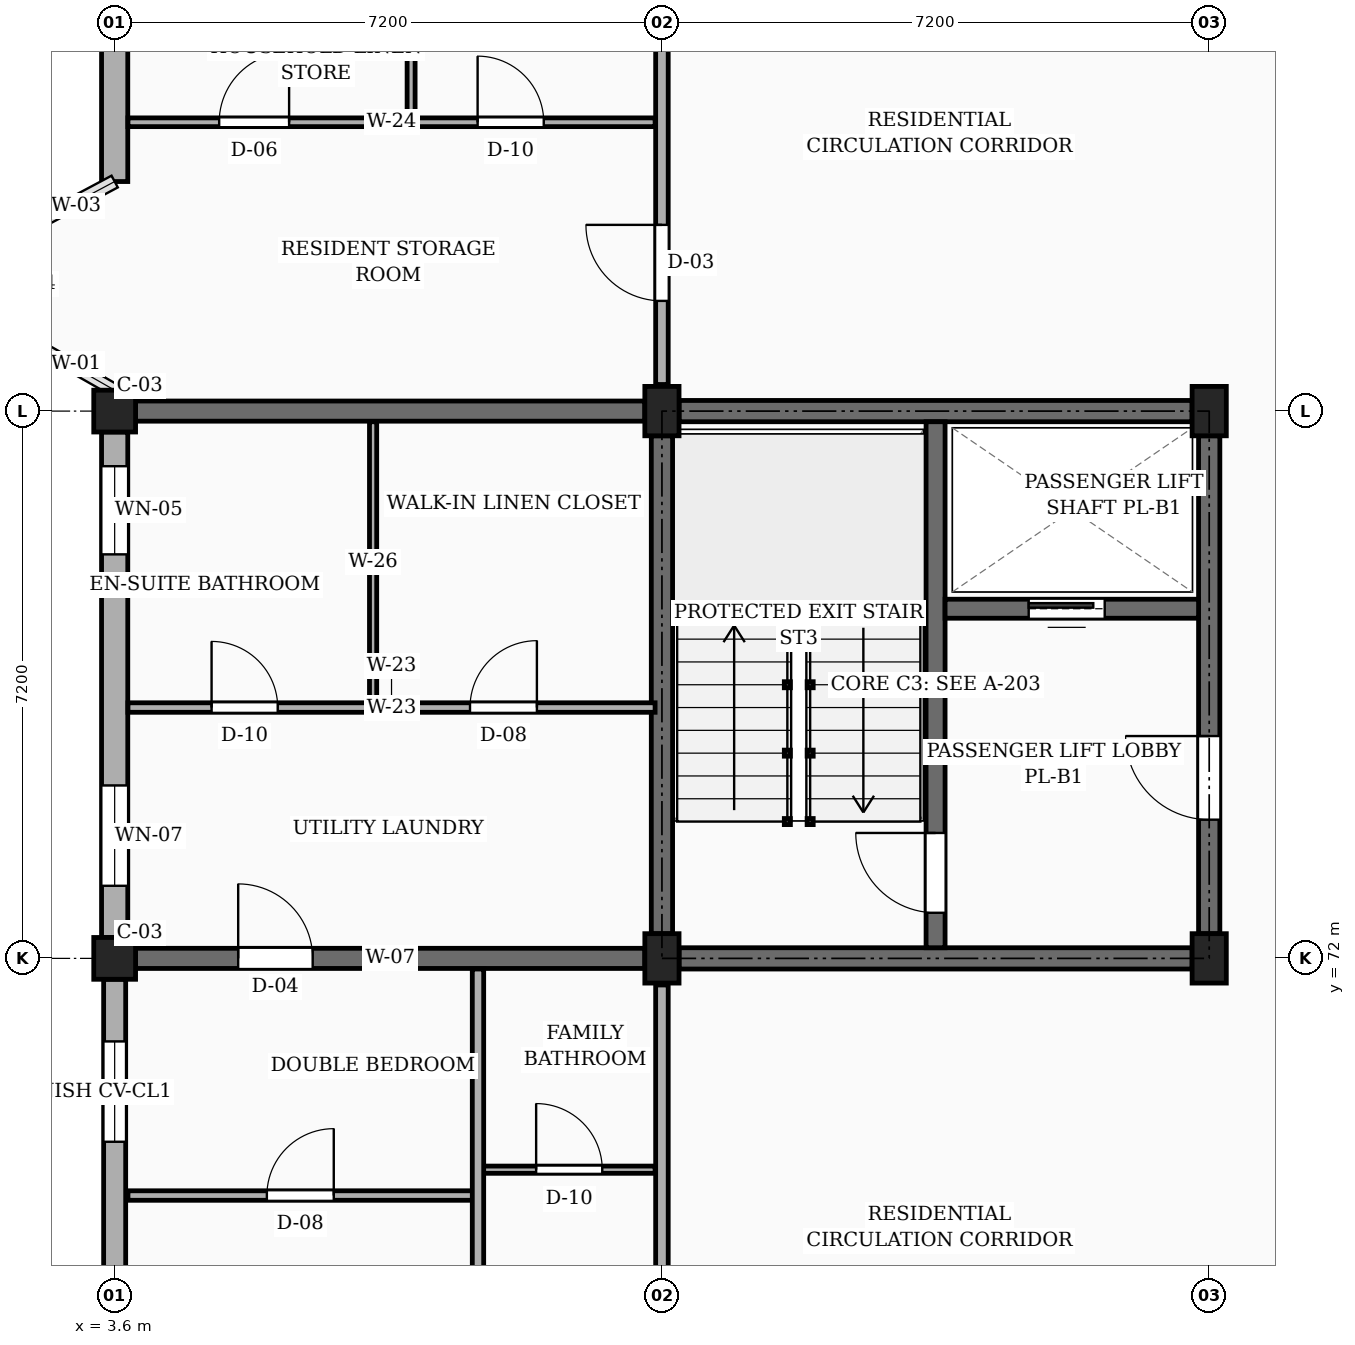
"""IFC4 building model, lengths in metres.
Left out: names, types, materials, properties, quantities, classifications, styles, units other than length and angle.
Written with IfcOpenShell. Run it as: python <this file> out.ifc"""

import sys

from ifc_helpers import new_model, si_unit, direction, frame, frame_2d, origin, origin_2d, place, context, subcontext, project, spatial, rectangle, extrude, element, fill, save


model = new_model("IFC4")
c1 = context("Model", 3, precision=1e-05, world=origin(), true_north=direction((0.0, 1.0)))
c2 = subcontext(c1, "Body", "Model", "MODEL_VIEW")
j1 = project(units=[si_unit("LENGTHUNIT", "METRE"), si_unit("PLANEANGLEUNIT", "RADIAN")], contexts=[c1])
p1 = place(None, origin())
s1 = spatial("IfcSite", under=j1, at=p1, CompositionType="ELEMENT")
p2 = place(p1, origin())
s2 = spatial("IfcBuilding", under=s1, at=p2, CompositionType="ELEMENT")
p3 = place(p2, frame((0.0, 0.0, 10.8)))
s3 = spatial("IfcBuildingStorey", under=s2, at=p3, CompositionType="ELEMENT", Elevation=10.8)
for number, where, z_axis, x_axis in (
    (1, (3.6, 72.0, 0.0), (0.0, 0.0, 1.0), (1.0, 0.0, 0.0)),
    (2, (3.6, 79.2, 0.0), (0.0, 0.0, 1.0), (1.0, 0.0, 0.0)),
):
    element("IfcColumn", number, at=place(p3, frame(where, z_axis=z_axis, x_axis=x_axis)), inside=s3, PredefinedType="COLUMN", context=c2, shape_type="SweptSolid", body=[
        extrude(rectangle(XDim=0.55, YDim=0.55, at=origin_2d()), origin(), (0.0, 0.0, 1.0), 3.15),
    ])
for number, where, z_axis, x_axis in (
    (3, (10.8, 72.0, 0.0), (0.0, 0.0, 1.0), (1.0, 0.0, 0.0)),
    (4, (10.8, 79.2, 0.0), (0.0, 0.0, 1.0), (1.0, 0.0, 0.0)),
    (5, (18.0, 72.0, 0.0), (0.0, 0.0, 1.0), (1.0, 0.0, 0.0)),
    (6, (18.0, 79.2, 0.0), (0.0, 0.0, 1.0), (1.0, 0.0, 0.0)),
):
    element("IfcColumn", number, at=place(p3, frame(where, z_axis=z_axis, x_axis=x_axis)), inside=s3, PredefinedType="COLUMN", context=c2, shape_type="SweptSolid", body=[
        extrude(rectangle(XDim=0.45, YDim=0.65, at=origin_2d()), origin(), (0.0, 0.0, 1.0), 3.15),
    ])
p4 = place(p3, frame((3.875, 72.0, 0.0), z_axis=(0.0, 0.0, 1.0), x_axis=(1.0, 0.0, 0.0)))
e7 = element("IfcWall", 7, at=p4, inside=s3, PredefinedType="SOLIDWALL", context=c2, shape_type="SweptSolid", body=[
    extrude(rectangle(XDim=6.7, YDim=0.265, at=frame_2d((3.35, 0.0))), origin(), (0.0, 0.0, 1.0), 2.21),
])
p5 = place(p4, frame((1.35, 0.0, 0.0)))
e8 = element("IfcOpeningElement", 8, at=p5, cuts=e7, PredefinedType="OPENING", context=c2, shape_type="SweptSolid", body=[
    extrude(rectangle(XDim=0.98, YDim=2.12, at=frame_2d((0.49, 1.06))), frame((0.0, 0.143, 0.0), z_axis=(0.0, -1.0, 0.0), x_axis=(1.0, 0.0, 0.0)), (0.0, 0.0, 1.0), 0.285),
])
p6 = place(p3, frame((3.875, 79.2, 0.0), z_axis=(0.0, 0.0, 1.0), x_axis=(1.0, 0.0, 0.0)))
e9 = element("IfcWall", 9, at=p6, inside=s3, PredefinedType="SOLIDWALL", context=c2, shape_type="SweptSolid", body=[
    extrude(rectangle(XDim=6.7, YDim=0.265, at=frame_2d((3.35, 0.0))), origin(), (0.0, 0.0, 1.0), 2.21),
])
p7 = place(p3, frame((3.6, 86.125, 0.0), z_axis=(0.0, 0.0, 1.0), x_axis=(0.0, -1.0, 0.0)))
e10 = element("IfcWall", 10, at=p7, inside=s3, PredefinedType="SOLIDWALL", context=c2, shape_type="SweptSolid", body=[
    extrude(rectangle(XDim=3.905, YDim=0.345, at=frame_2d((1.953, 0.0))), origin(), (0.0, 0.0, 1.0), 2.48),
])
p8 = place(p7, frame((1.077, 0.0, 0.78)))
e11 = element("IfcOpeningElement", 11, at=p8, cuts=e10, PredefinedType="OPENING", context=c2, shape_type="SweptSolid", body=[
    extrude(rectangle(XDim=1.08, YDim=1.15, at=frame_2d((0.54, 0.575))), frame((0.0, 0.183, 0.0), z_axis=(0.0, -1.0, 0.0), x_axis=(1.0, 0.0, 0.0)), (0.0, 0.0, 1.0), 0.365),
])
p9 = place(p3, frame((3.6, 78.925, 0.0), z_axis=(0.0, 0.0, 1.0), x_axis=(0.0, -1.0, 0.0)))
e12 = element("IfcWall", 12, at=p9, inside=s3, PredefinedType="SOLIDWALL", context=c2, shape_type="SweptSolid", body=[
    extrude(rectangle(XDim=6.65, YDim=0.345, at=frame_2d((3.325, 0.0))), origin(), (0.0, 0.0, 1.0), 2.48),
])
p10 = place(p9, frame((0.45, 0.0, 0.78)))
e13 = element("IfcOpeningElement", 13, at=p10, cuts=e12, PredefinedType="OPENING", context=c2, shape_type="SweptSolid", body=[
    extrude(rectangle(XDim=1.16, YDim=1.15, at=frame_2d((0.58, 0.575))), frame((0.0, 0.183, 0.0), z_axis=(0.0, -1.0, 0.0), x_axis=(1.0, 0.0, 0.0)), (0.0, 0.0, 1.0), 0.365),
])
p11 = place(p9, frame((4.65, 0.0, 0.78)))
e14 = element("IfcOpeningElement", 14, at=p11, cuts=e12, PredefinedType="OPENING", context=c2, shape_type="SweptSolid", body=[
    extrude(rectangle(XDim=1.32, YDim=1.15, at=frame_2d((0.66, 0.575))), frame((0.0, 0.183, 0.0), z_axis=(0.0, -1.0, 0.0), x_axis=(1.0, 0.0, 0.0)), (0.0, 0.0, 1.0), 0.365),
])
p12 = place(p3, frame((3.6, 71.725, 0.0), z_axis=(0.0, 0.0, 1.0), x_axis=(0.0, -1.0, 0.0)))
e15 = element("IfcWall", 15, at=p12, inside=s3, PredefinedType="SOLIDWALL", context=c2, shape_type="SweptSolid", body=[
    extrude(rectangle(XDim=3.905, YDim=0.29, at=frame_2d((1.953, 0.0))), origin(), (0.0, 0.0, 1.0), 2.48),
])
p13 = place(p12, frame((0.817, 0.0, 0.78)))
e16 = element("IfcOpeningElement", 16, at=p13, cuts=e15, PredefinedType="OPENING", context=c2, shape_type="SweptSolid", body=[
    extrude(rectangle(XDim=1.32, YDim=1.15, at=frame_2d((0.66, 0.575))), frame((0.0, 0.155, 0.0), z_axis=(0.0, -1.0, 0.0), x_axis=(1.0, 0.0, 0.0)), (0.0, 0.0, 1.0), 0.31),
])
p14 = place(p3, frame((10.8, 72.325, 0.0), z_axis=(0.0, 0.0, 1.0), x_axis=(0.0, 1.0, 0.0)))
e17 = element("IfcWall", 17, at=p14, inside=s3, PredefinedType="SHEAR", context=c2, shape_type="SweptSolid", body=[
    extrude(rectangle(XDim=6.55, YDim=0.28, at=frame_2d((3.275, 0.0))), origin(), (0.0, 0.0, 1.0), 2.91),
])
p15 = place(p3, frame((11.025, 79.2, 0.0), z_axis=(0.0, 0.0, 1.0), x_axis=(1.0, 0.0, 0.0)))
e18 = element("IfcWall", 18, at=p15, inside=s3, PredefinedType="SHEAR", context=c2, shape_type="SweptSolid", body=[
    extrude(rectangle(XDim=6.75, YDim=0.28, at=frame_2d((3.375, 0.0))), origin(), (0.0, 0.0, 1.0), 2.91),
])
p16 = place(p3, frame((18.0, 72.325, 0.0), z_axis=(0.0, 0.0, 1.0), x_axis=(0.0, 1.0, 0.0)))
e19 = element("IfcWall", 19, at=p16, inside=s3, PredefinedType="SHEAR", context=c2, shape_type="SweptSolid", body=[
    extrude(rectangle(XDim=6.55, YDim=0.28, at=frame_2d((3.275, 0.0))), origin(), (0.0, 0.0, 1.0), 2.91),
])
p17 = place(p16, frame((1.5, 0.0, 0.0)))
e20 = element("IfcOpeningElement", 20, at=p17, cuts=e19, PredefinedType="OPENING", context=c2, shape_type="SweptSolid", body=[
    extrude(rectangle(XDim=1.1, YDim=2.15, at=frame_2d((0.55, 1.075))), frame((0.0, 0.15, 0.0), z_axis=(0.0, -1.0, 0.0), x_axis=(1.0, 0.0, 0.0)), (0.0, 0.0, 1.0), 0.3),
])
p18 = place(p3, frame((11.025, 72.0, 0.0), z_axis=(0.0, 0.0, 1.0), x_axis=(1.0, 0.0, 0.0)))
e21 = element("IfcWall", 21, at=p18, inside=s3, PredefinedType="SHEAR", context=c2, shape_type="SweptSolid", body=[
    extrude(rectangle(XDim=6.75, YDim=0.28, at=frame_2d((3.375, 0.0))), origin(), (0.0, 0.0, 1.0), 2.91),
])
p19 = place(p3, frame((14.4, 72.14, 0.0), z_axis=(0.0, 0.0, 1.0), x_axis=(0.0, 1.0, 0.0)))
e22 = element("IfcWall", 22, at=p19, inside=s3, PredefinedType="SHEAR", context=c2, shape_type="SweptSolid", body=[
    extrude(rectangle(XDim=6.92, YDim=0.25, at=frame_2d((3.46, 0.0))), origin(), (0.0, 0.0, 1.0), 2.91),
])
p20 = place(p19, frame((0.46, 0.0, 0.0)))
e23 = element("IfcOpeningElement", 23, at=p20, cuts=e22, PredefinedType="OPENING", context=c2, shape_type="SweptSolid", body=[
    extrude(rectangle(XDim=1.05, YDim=2.15, at=frame_2d((0.525, 1.075))), frame((0.0, 0.135, 0.0), z_axis=(0.0, -1.0, 0.0), x_axis=(1.0, 0.0, 0.0)), (0.0, 0.0, 1.0), 0.27),
])
p21 = place(p3, frame((14.525, 76.6, 0.0), z_axis=(0.0, 0.0, 1.0), x_axis=(1.0, 0.0, 0.0)))
e24 = element("IfcWall", 24, at=p21, inside=s3, PredefinedType="SHEAR", context=c2, shape_type="SweptSolid", body=[
    extrude(rectangle(XDim=3.335, YDim=0.25, at=frame_2d((1.667, 0.0))), origin(), (0.0, 0.0, 1.0), 2.91),
])
p22 = place(p21, frame((1.1, 0.0, 0.0)))
e25 = element("IfcOpeningElement", 25, at=p22, cuts=e24, PredefinedType="OPENING", context=c2, shape_type="SweptSolid", body=[
    extrude(rectangle(XDim=1.0, YDim=2.2, at=frame_2d((0.5, 1.1))), frame((0.0, 0.135, 0.0), z_axis=(0.0, -1.0, 0.0), x_axis=(1.0, 0.0, 0.0)), (0.0, 0.0, 1.0), 0.27),
])
p23 = place(p3, frame((10.8, 65.15, 0.0), z_axis=(0.0, 0.0, 1.0), x_axis=(0.0, 1.0, 0.0)))
e26 = element("IfcWall", 26, at=p23, inside=s3, PredefinedType="PARTITIONING", context=c2, shape_type="SweptSolid", body=[
    extrude(rectangle(XDim=6.5, YDim=0.165, at=frame_2d((3.25, 0.0))), origin(), (0.0, 0.0, 1.0), 2.26),
])
p24 = place(p23, frame((1.0, 0.0, 0.0)))
e27 = element("IfcOpeningElement", 27, at=p24, cuts=e26, PredefinedType="OPENING", context=c2, shape_type="SweptSolid", body=[
    extrude(rectangle(XDim=1.14, YDim=2.18, at=frame_2d((0.57, 1.09))), frame((0.0, 0.093, 0.0), z_axis=(0.0, -1.0, 0.0), x_axis=(1.0, 0.0, 0.0)), (0.0, 0.0, 1.0), 0.185),
])
p25 = place(p3, frame((10.8, 79.55, 0.0), z_axis=(0.0, 0.0, 1.0), x_axis=(0.0, 1.0, 0.0)))
e28 = element("IfcWall", 28, at=p25, inside=s3, PredefinedType="PARTITIONING", context=c2, shape_type="SweptSolid", body=[
    extrude(rectangle(XDim=6.5, YDim=0.165, at=frame_2d((3.25, 0.0))), origin(), (0.0, 0.0, 1.0), 2.26),
])
p26 = place(p25, frame((1.1, 0.0, 0.0)))
e29 = element("IfcOpeningElement", 29, at=p26, cuts=e28, PredefinedType="OPENING", context=c2, shape_type="SweptSolid", body=[
    extrude(rectangle(XDim=1.0, YDim=2.15, at=frame_2d((0.5, 1.075))), frame((0.0, 0.093, 0.0), z_axis=(0.0, -1.0, 0.0), x_axis=(1.0, 0.0, 0.0)), (0.0, 0.0, 1.0), 0.185),
])
p27 = place(p3, frame((3.775, 68.88, 0.0), z_axis=(0.0, 0.0, 1.0), x_axis=(1.0, 0.0, 0.0)))
e30 = element("IfcWall", 30, at=p27, inside=s3, PredefinedType="PARTITIONING", context=c2, shape_type="SweptSolid", body=[
    extrude(rectangle(XDim=4.535, YDim=0.125, at=frame_2d((2.268, 0.0))), origin(), (0.0, 0.0, 1.0), 2.345),
])
p28 = place(p27, frame((1.827, 0.0, 0.0)))
e31 = element("IfcOpeningElement", 31, at=p28, cuts=e30, PredefinedType="OPENING", context=c2, shape_type="SweptSolid", body=[
    extrude(rectangle(XDim=0.88, YDim=2.08, at=frame_2d((0.44, 1.04))), frame((0.0, 0.073, 0.0), z_axis=(0.0, -1.0, 0.0), x_axis=(1.0, 0.0, 0.0)), (0.0, 0.0, 1.0), 0.145),
])
p29 = place(p3, frame((8.45, 69.22, 0.0), z_axis=(0.0, 0.0, 1.0), x_axis=(1.0, 0.0, 0.0)))
e32 = element("IfcWall", 32, at=p29, inside=s3, PredefinedType="PARTITIONING", context=c2, shape_type="SweptSolid", body=[
    extrude(rectangle(XDim=2.26, YDim=0.095, at=frame_2d((1.13, 0.0))), origin(), (0.0, 0.0, 1.0), 2.345),
])
p30 = place(p29, frame((0.695, 0.0, 0.0)))
e33 = element("IfcOpeningElement", 33, at=p30, cuts=e32, PredefinedType="OPENING", context=c2, shape_type="SweptSolid", body=[
    extrude(rectangle(XDim=0.87, YDim=2.05, at=frame_2d((0.435, 1.025))), frame((0.0, 0.058, 0.0), z_axis=(0.0, -1.0, 0.0), x_axis=(1.0, 0.0, 0.0)), (0.0, 0.0, 1.0), 0.115),
])
p31 = place(p3, frame((8.38, 64.975, 0.0), z_axis=(0.0, 0.0, 1.0), x_axis=(0.0, 1.0, 0.0)))
e34 = element("IfcWall", 34, at=p31, inside=s3, PredefinedType="PARTITIONING", context=c2, shape_type="SweptSolid", body=[
    extrude(rectangle(XDim=6.885, YDim=0.15, at=frame_2d((3.442, 0.0))), origin(), (0.0, 0.0, 1.0), 2.345),
])
p32 = place(p31, frame((1.275, 0.0, 0.0)))
e35 = element("IfcOpeningElement", 35, at=p32, cuts=e34, PredefinedType="OPENING", context=c2, shape_type="SweptSolid", body=[
    extrude(rectangle(XDim=0.92, YDim=2.1, at=frame_2d((0.46, 1.05))), frame((0.0, 0.085, 0.0), z_axis=(0.0, -1.0, 0.0), x_axis=(1.0, 0.0, 0.0)), (0.0, 0.0, 1.0), 0.17),
])
p33 = place(p3, frame((3.775, 75.3, 0.0), z_axis=(0.0, 0.0, 1.0), x_axis=(1.0, 0.0, 0.0)))
e36 = element("IfcWall", 36, at=p33, inside=s3, PredefinedType="PARTITIONING", context=c2, shape_type="SweptSolid", body=[
    extrude(rectangle(XDim=6.935, YDim=0.125, at=frame_2d((3.468, 0.0))), origin(), (0.0, 0.0, 1.0), 2.345),
])
p34 = place(p33, frame((1.1, 0.0, 0.0)))
e37 = element("IfcOpeningElement", 37, at=p34, cuts=e36, PredefinedType="OPENING", context=c2, shape_type="SweptSolid", body=[
    extrude(rectangle(XDim=0.87, YDim=2.05, at=frame_2d((0.435, 1.025))), frame((0.0, 0.073, 0.0), z_axis=(0.0, -1.0, 0.0), x_axis=(1.0, 0.0, 0.0)), (0.0, 0.0, 1.0), 0.145),
])
p35 = place(p33, frame((4.5, 0.0, 0.0)))
e38 = element("IfcOpeningElement", 38, at=p35, cuts=e36, PredefinedType="OPENING", context=c2, shape_type="SweptSolid", body=[
    extrude(rectangle(XDim=0.88, YDim=2.08, at=frame_2d((0.44, 1.04))), frame((0.0, 0.073, 0.0), z_axis=(0.0, -1.0, 0.0), x_axis=(1.0, 0.0, 0.0)), (0.0, 0.0, 1.0), 0.145),
])
p36 = place(p3, frame((7.0, 75.37, 0.0), z_axis=(0.0, 0.0, 1.0), x_axis=(0.0, 1.0, 0.0)))
e39 = element("IfcWall", 39, at=p36, inside=s3, PredefinedType="PARTITIONING", context=c2, shape_type="SweptSolid", body=[
    extrude(rectangle(XDim=3.69, YDim=0.095, at=frame_2d((1.845, 0.0))), origin(), (0.0, 0.0, 1.0), 2.345),
])
p37 = place(p3, frame((3.775, 83.0, 0.0), z_axis=(0.0, 0.0, 1.0), x_axis=(1.0, 0.0, 0.0)))
e40 = element("IfcWall", 40, at=p37, inside=s3, PredefinedType="PARTITIONING", context=c2, shape_type="SweptSolid", body=[
    extrude(rectangle(XDim=6.935, YDim=0.115, at=frame_2d((3.468, 0.0))), origin(), (0.0, 0.0, 1.0), 2.345),
])
p38 = place(p37, frame((4.6, 0.0, 0.0)))
e41 = element("IfcOpeningElement", 41, at=p38, cuts=e40, PredefinedType="OPENING", context=c2, shape_type="SweptSolid", body=[
    extrude(rectangle(XDim=0.87, YDim=2.05, at=frame_2d((0.435, 1.025))), frame((0.0, 0.067, 0.0), z_axis=(0.0, -1.0, 0.0), x_axis=(1.0, 0.0, 0.0)), (0.0, 0.0, 1.0), 0.135),
])
p39 = place(p37, frame((1.2, 0.0, 0.0)))
e42 = element("IfcOpeningElement", 42, at=p39, cuts=e40, PredefinedType="OPENING", context=c2, shape_type="SweptSolid", body=[
    extrude(rectangle(XDim=0.92, YDim=2.1, at=frame_2d((0.46, 1.05))), frame((0.0, 0.067, 0.0), z_axis=(0.0, -1.0, 0.0), x_axis=(1.0, 0.0, 0.0)), (0.0, 0.0, 1.0), 0.135),
])
p40 = place(p3, frame((7.5, 83.07, 0.0), z_axis=(0.0, 0.0, 1.0), x_axis=(0.0, 1.0, 0.0)))
e43 = element("IfcWall", 43, at=p40, inside=s3, PredefinedType="PARTITIONING", context=c2, shape_type="SweptSolid", body=[
    extrude(rectangle(XDim=3.19, YDim=0.105, at=frame_2d((1.595, 0.0))), origin(), (0.0, 0.0, 1.0), 2.345),
])
p41 = place(p10, origin())
e44 = element("IfcWindow", 44, at=p41, inside=s3, PartitioningType="SINGLE_PANEL", PredefinedType="WINDOW", context=c2, shape_type="SweptSolid", body=[
    extrude(rectangle(XDim=1.16, YDim=1.15, at=frame_2d((0.58, 0.575))), frame((0.0, 0.03, 0.0), z_axis=(0.0, -1.0, 0.0), x_axis=(1.0, 0.0, 0.0)), (0.0, 0.0, 1.0), 0.06),
])
fill(e13, e44)
p42 = place(p11, origin())
e45 = element("IfcWindow", 45, at=p42, inside=s3, PartitioningType="SINGLE_PANEL", PredefinedType="WINDOW", context=c2, shape_type="SweptSolid", body=[
    extrude(rectangle(XDim=1.32, YDim=1.15, at=frame_2d((0.66, 0.575))), frame((0.0, 0.03, 0.0), z_axis=(0.0, -1.0, 0.0), x_axis=(1.0, 0.0, 0.0)), (0.0, 0.0, 1.0), 0.06),
])
fill(e14, e45)
p43 = place(p13, origin())
e46 = element("IfcWindow", 46, at=p43, inside=s3, PartitioningType="SINGLE_PANEL", PredefinedType="WINDOW", context=c2, shape_type="SweptSolid", body=[
    extrude(rectangle(XDim=1.32, YDim=1.15, at=frame_2d((0.66, 0.575))), frame((0.0, 0.03, 0.0), z_axis=(0.0, -1.0, 0.0), x_axis=(1.0, 0.0, 0.0)), (0.0, 0.0, 1.0), 0.06),
])
fill(e16, e46)
p44 = place(p17, frame((1.1, 0.0, 0.0), z_axis=(0.0, 0.0, 1.0), x_axis=(-1.0, 0.0, 0.0)))
e47 = element("IfcDoor", 47, at=p44, inside=s3, OperationType="SINGLE_SWING_RIGHT", PredefinedType="DOOR", context=c2, shape_type="SweptSolid", body=[
    extrude(rectangle(XDim=1.1, YDim=2.15, at=frame_2d((0.55, 1.075))), frame((0.0, 0.025, 0.0), z_axis=(0.0, -1.0, 0.0), x_axis=(1.0, 0.0, 0.0)), (0.0, 0.0, 1.0), 0.05),
])
fill(e20, e47)
p45 = place(p20, origin())
e48 = element("IfcDoor", 48, at=p45, inside=s3, OperationType="SINGLE_SWING_RIGHT", PredefinedType="DOOR", context=c2, shape_type="SweptSolid", body=[
    extrude(rectangle(XDim=1.05, YDim=2.15, at=frame_2d((0.525, 1.075))), frame((0.0, 0.025, 0.0), z_axis=(0.0, -1.0, 0.0), x_axis=(1.0, 0.0, 0.0)), (0.0, 0.0, 1.0), 0.05),
])
fill(e23, e48)
p46 = place(p22, origin())
e49 = element("IfcDoor", 49, at=p46, inside=s3, OperationType="SLIDING_TO_LEFT", PredefinedType="DOOR", context=c2, shape_type="SweptSolid", body=[
    extrude(rectangle(XDim=1.0, YDim=2.2, at=frame_2d((0.5, 1.1))), frame((0.0, 0.025, 0.0), z_axis=(0.0, -1.0, 0.0), x_axis=(1.0, 0.0, 0.0)), (0.0, 0.0, 1.0), 0.05),
])
fill(e25, e49)
p47 = place(p26, origin())
e50 = element("IfcDoor", 50, at=p47, inside=s3, OperationType="SINGLE_SWING_RIGHT", PredefinedType="DOOR", context=c2, shape_type="SweptSolid", body=[
    extrude(rectangle(XDim=1.0, YDim=2.15, at=frame_2d((0.5, 1.075))), frame((0.0, 0.025, 0.0), z_axis=(0.0, -1.0, 0.0), x_axis=(1.0, 0.0, 0.0)), (0.0, 0.0, 1.0), 0.05),
])
fill(e29, e50)
p48 = place(p28, origin())
e51 = element("IfcDoor", 51, at=p48, inside=s3, OperationType="SINGLE_SWING_RIGHT", PredefinedType="DOOR", context=c2, shape_type="SweptSolid", body=[
    extrude(rectangle(XDim=0.88, YDim=2.08, at=frame_2d((0.44, 1.04))), frame((0.0, 0.025, 0.0), z_axis=(0.0, -1.0, 0.0), x_axis=(1.0, 0.0, 0.0)), (0.0, 0.0, 1.0), 0.05),
])
fill(e31, e51)
p49 = place(p30, origin())
e52 = element("IfcDoor", 52, at=p49, inside=s3, OperationType="SINGLE_SWING_LEFT", PredefinedType="DOOR", context=c2, shape_type="SweptSolid", body=[
    extrude(rectangle(XDim=0.87, YDim=2.05, at=frame_2d((0.435, 1.025))), frame((0.0, 0.025, 0.0), z_axis=(0.0, -1.0, 0.0), x_axis=(1.0, 0.0, 0.0)), (0.0, 0.0, 1.0), 0.05),
])
fill(e33, e52)
p50 = place(p34, origin())
e53 = element("IfcDoor", 53, at=p50, inside=s3, OperationType="SINGLE_SWING_LEFT", PredefinedType="DOOR", context=c2, shape_type="SweptSolid", body=[
    extrude(rectangle(XDim=0.87, YDim=2.05, at=frame_2d((0.435, 1.025))), frame((0.0, 0.025, 0.0), z_axis=(0.0, -1.0, 0.0), x_axis=(1.0, 0.0, 0.0)), (0.0, 0.0, 1.0), 0.05),
])
fill(e37, e53)
p51 = place(p35, origin())
e54 = element("IfcDoor", 54, at=p51, inside=s3, OperationType="SINGLE_SWING_RIGHT", PredefinedType="DOOR", context=c2, shape_type="SweptSolid", body=[
    extrude(rectangle(XDim=0.88, YDim=2.08, at=frame_2d((0.44, 1.04))), frame((0.0, 0.025, 0.0), z_axis=(0.0, -1.0, 0.0), x_axis=(1.0, 0.0, 0.0)), (0.0, 0.0, 1.0), 0.05),
])
fill(e38, e54)
p52 = place(p38, origin())
e55 = element("IfcDoor", 55, at=p52, inside=s3, OperationType="SINGLE_SWING_LEFT", PredefinedType="DOOR", context=c2, shape_type="SweptSolid", body=[
    extrude(rectangle(XDim=0.87, YDim=2.05, at=frame_2d((0.435, 1.025))), frame((0.0, 0.025, 0.0), z_axis=(0.0, -1.0, 0.0), x_axis=(1.0, 0.0, 0.0)), (0.0, 0.0, 1.0), 0.05),
])
fill(e41, e55)
p53 = place(p39, origin())
e56 = element("IfcDoor", 56, at=p53, inside=s3, OperationType="SINGLE_SWING_RIGHT", PredefinedType="DOOR", context=c2, shape_type="SweptSolid", body=[
    extrude(rectangle(XDim=0.92, YDim=2.1, at=frame_2d((0.46, 1.05))), frame((0.0, 0.025, 0.0), z_axis=(0.0, -1.0, 0.0), x_axis=(1.0, 0.0, 0.0)), (0.0, 0.0, 1.0), 0.05),
])
fill(e42, e56)
p54 = place(p5, origin())
e57 = element("IfcDoor", 57, at=p54, inside=s3, OperationType="SINGLE_SWING_LEFT", PredefinedType="DOOR", context=c2, shape_type="SweptSolid", body=[
    extrude(rectangle(XDim=0.98, YDim=2.12, at=frame_2d((0.49, 1.06))), frame((0.0, 0.025, 0.0), z_axis=(0.0, -1.0, 0.0), x_axis=(1.0, 0.0, 0.0)), (0.0, 0.0, 1.0), 0.05),
])
fill(e8, e57)
save(model, sys.argv[1])
